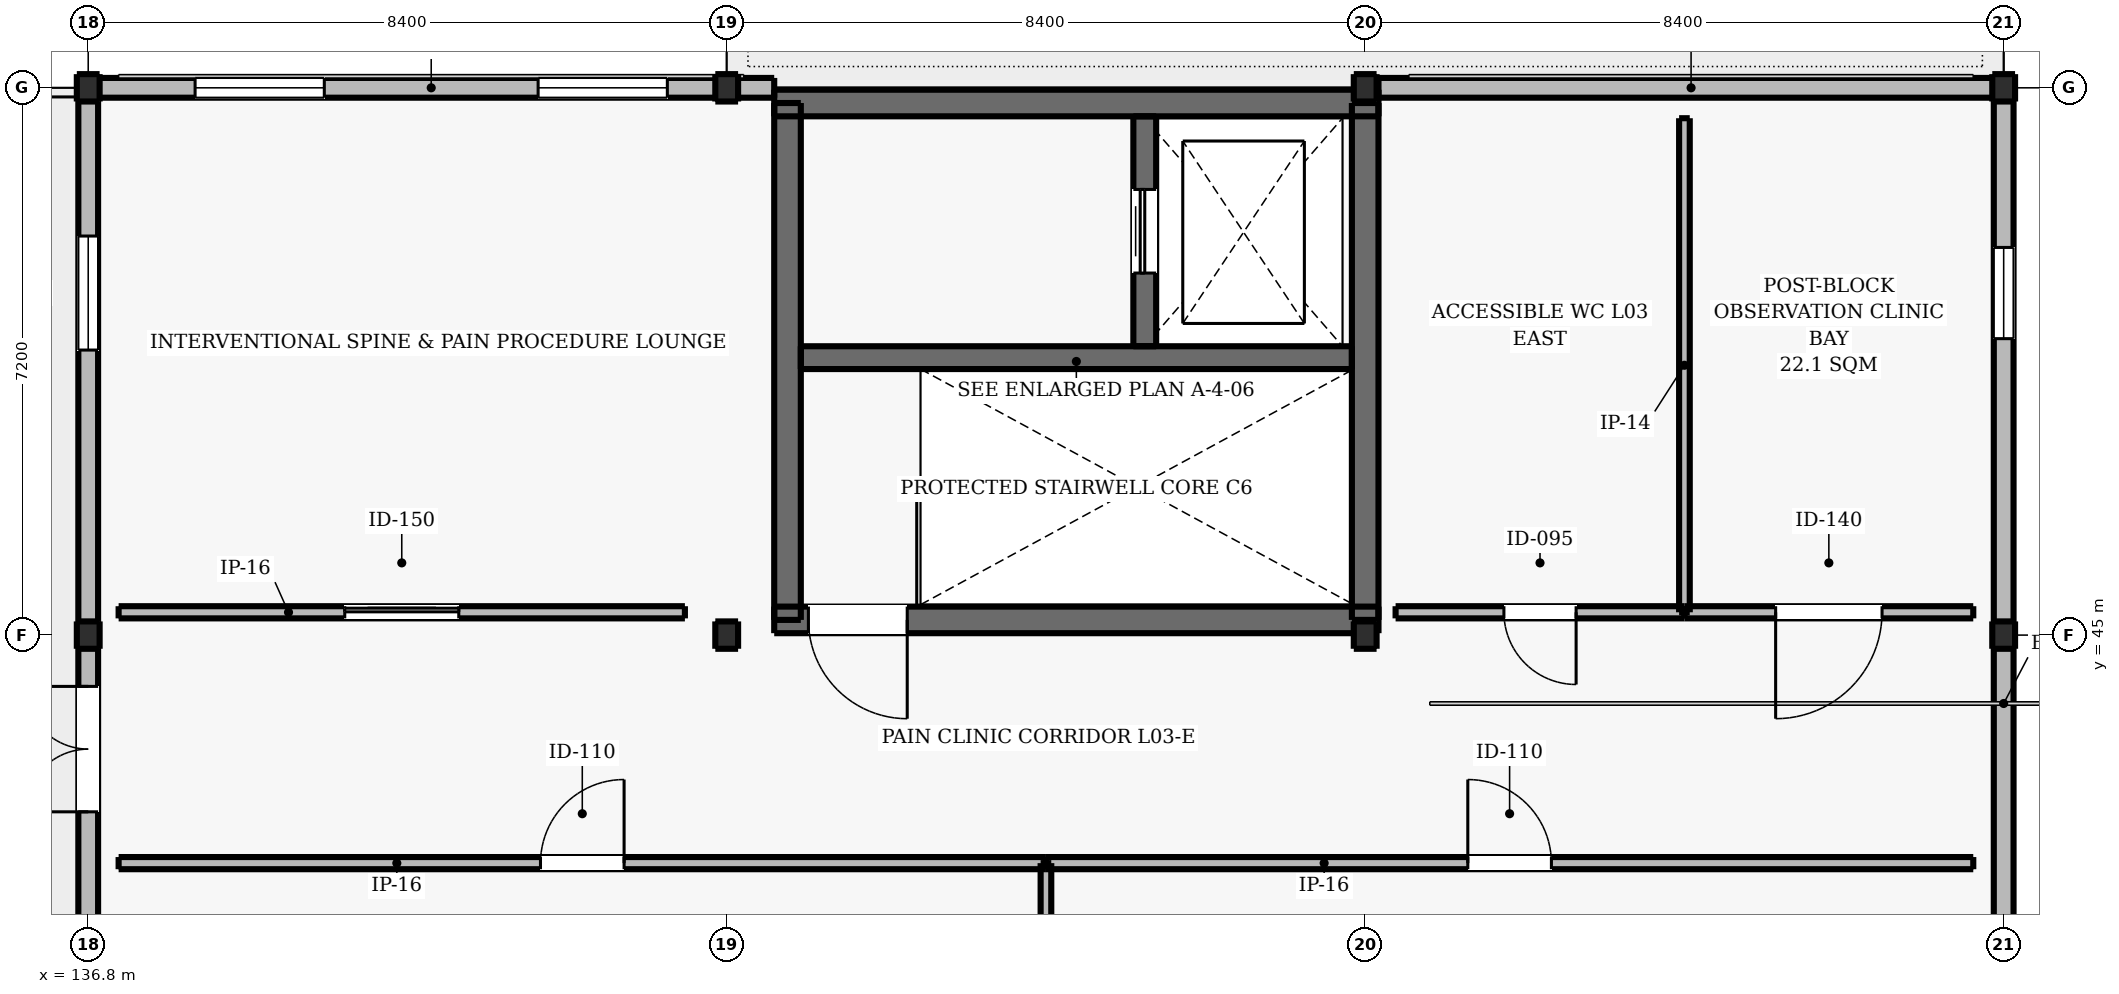
"""IFC4 building model, lengths in metres.
Left out: names, types, materials, properties, quantities, classifications, styles, units other than length and angle.
Written with IfcOpenShell. Run it as: python <this file> out.ifc"""

import sys

from ifc_helpers import new_model, si_unit, direction, frame, frame_2d, origin, origin_2d, place, context, subcontext, project, spatial, rectangle, i_section, extrude, element, fill, save


model = new_model("IFC4")
c1 = context("Model", 3, precision=1e-05, world=origin(), true_north=direction((0.0, 1.0)))
c2 = subcontext(c1, "Body", "Model", "MODEL_VIEW")
j1 = project(units=[si_unit("LENGTHUNIT", "METRE"), si_unit("PLANEANGLEUNIT", "RADIAN")], contexts=[c1])
p1 = place(None, origin())
s1 = spatial("IfcSite", under=j1, at=p1, CompositionType="ELEMENT")
p2 = place(p1, origin())
s2 = spatial("IfcBuilding", under=s1, at=p2, CompositionType="ELEMENT")
p3 = place(p2, frame((0.0, 0.0, 13.8)))
s3 = spatial("IfcBuildingStorey", under=s2, at=p3, CompositionType="ELEMENT", Elevation=13.8)
for number, where, z_axis, x_axis in (
    (1, (136.8, 45.0, 0.0), (0.0, 0.0, 1.0), (1.0, 0.0, 0.0)),
    (2, (136.8, 52.2, 0.0), (0.0, 0.0, 1.0), (1.0, 0.0, 0.0)),
    (3, (145.2, 45.0, 0.0), (0.0, 0.0, 1.0), (1.0, 0.0, 0.0)),
    (4, (145.2, 52.2, 0.0), (0.0, 0.0, 1.0), (1.0, 0.0, 0.0)),
    (5, (153.6, 45.0, 0.0), (0.0, 0.0, 1.0), (1.0, 0.0, 0.0)),
    (6, (153.6, 52.2, 0.0), (0.0, 0.0, 1.0), (1.0, 0.0, 0.0)),
    (7, (162.0, 45.0, 0.0), (0.0, 0.0, 1.0), (1.0, 0.0, 0.0)),
    (8, (162.0, 52.2, 0.0), (0.0, 0.0, 1.0), (1.0, 0.0, 0.0)),
):
    element("IfcColumn", number, at=place(p3, frame(where, z_axis=z_axis, x_axis=x_axis)), inside=s3, PredefinedType="COLUMN", context=c2, shape_type="SweptSolid", body=[
        extrude(i_section(OverallWidth=0.3, OverallDepth=0.36, WebThickness=0.012, FlangeThickness=0.022, FilletRadius=0.027, at=origin_2d()), origin(), (0.0, 0.0, 1.0), 4.2),
    ])
p4 = place(p3, frame((145.825, 45.2, 0.0), z_axis=(0.0, 0.0, 1.0), x_axis=(1.0, 0.0, 0.0)))
e9 = element("IfcWall", 9, at=p4, inside=s3, PredefinedType="SHEAR", context=c2, shape_type="SweptSolid", body=[
    extrude(rectangle(XDim=7.95, YDim=0.35, at=frame_2d((3.975, 0.0))), origin(), (0.0, 0.0, 1.0), 4.2),
])
p5 = place(p4, frame((0.45, 0.0, 0.0)))
e10 = element("IfcOpeningElement", 10, at=p5, cuts=e9, PredefinedType="OPENING", context=c2, shape_type="SweptSolid", body=[
    extrude(rectangle(XDim=1.3, YDim=2.15, at=frame_2d((0.65, 1.075))), frame((0.0, 0.185, 0.0), z_axis=(0.0, -1.0, 0.0), x_axis=(1.0, 0.0, 0.0)), (0.0, 0.0, 1.0), 0.37),
])
p6 = place(p3, frame((145.825, 52.0, 0.0), z_axis=(0.0, 0.0, 1.0), x_axis=(1.0, 0.0, 0.0)))
e11 = element("IfcWall", 11, at=p6, inside=s3, PredefinedType="SHEAR", context=c2, shape_type="SweptSolid", body=[
    extrude(rectangle(XDim=7.95, YDim=0.35, at=frame_2d((3.975, 0.0))), origin(), (0.0, 0.0, 1.0), 4.2),
])
for number, where, z_axis, x_axis in (
    (12, (146.0, 45.2, 0.0), (0.0, 0.0, 1.0), (0.0, 1.0, 0.0)),
    (13, (153.6, 45.2, 0.0), (0.0, 0.0, 1.0), (0.0, 1.0, 0.0)),
):
    element("IfcWall", number, at=place(p3, frame(where, z_axis=z_axis, x_axis=x_axis)), inside=s3, PredefinedType="SHEAR", context=c2, shape_type="SweptSolid", body=[
        extrude(rectangle(XDim=6.8, YDim=0.35, at=frame_2d((3.4, 0.0))), origin(), (0.0, 0.0, 1.0), 4.2),
    ])
p7 = place(p3, frame((146.175, 48.65, 0.0), z_axis=(0.0, 0.0, 1.0), x_axis=(1.0, 0.0, 0.0)))
e14 = element("IfcWall", 14, at=p7, inside=s3, PredefinedType="SHEAR", context=c2, shape_type="SweptSolid", body=[
    extrude(rectangle(XDim=7.25, YDim=0.3, at=frame_2d((3.625, 0.0))), origin(), (0.0, 0.0, 1.0), 4.2),
])
p8 = place(p3, frame((150.7, 48.8, 0.0), z_axis=(0.0, 0.0, 1.0), x_axis=(0.0, 1.0, 0.0)))
e15 = element("IfcWall", 15, at=p8, inside=s3, PredefinedType="SHEAR", context=c2, shape_type="SweptSolid", body=[
    extrude(rectangle(XDim=3.025, YDim=0.3, at=frame_2d((1.512, 0.0))), origin(), (0.0, 0.0, 1.0), 4.2),
])
p9 = place(p8, frame((0.963, 0.0, 0.0)))
e16 = element("IfcOpeningElement", 16, at=p9, cuts=e15, PredefinedType="OPENING", context=c2, shape_type="SweptSolid", body=[
    extrude(rectangle(XDim=1.1, YDim=2.15, at=frame_2d((0.55, 1.075))), frame((0.0, 0.16, 0.0), z_axis=(0.0, -1.0, 0.0), x_axis=(1.0, 0.0, 0.0)), (0.0, 0.0, 1.0), 0.32),
])
p10 = place(p3, frame((136.8, 52.2, 0.0), z_axis=(0.0, 0.0, 1.0), x_axis=(1.0, 0.0, 0.0)))
e17 = element("IfcWall", 17, at=p10, inside=s3, PredefinedType="SOLIDWALL", context=c2, shape_type="SweptSolid", body=[
    extrude(rectangle(XDim=9.025, YDim=0.26, at=frame_2d((4.512, 0.0))), origin(), (0.0, 0.0, 1.0), 3.53),
])
p11 = place(p10, frame((1.406, 0.0, 0.95)))
e18 = element("IfcOpeningElement", 18, at=p11, cuts=e17, PredefinedType="OPENING", context=c2, shape_type="SweptSolid", body=[
    extrude(rectangle(XDim=1.7, YDim=2.0, at=frame_2d((0.85, 1.0))), frame((0.0, 0.14, 0.0), z_axis=(0.0, -1.0, 0.0), x_axis=(1.0, 0.0, 0.0)), (0.0, 0.0, 1.0), 0.28),
])
p12 = place(p10, frame((5.919, 0.0, 0.95)))
e19 = element("IfcOpeningElement", 19, at=p12, cuts=e17, PredefinedType="OPENING", context=c2, shape_type="SweptSolid", body=[
    extrude(rectangle(XDim=1.7, YDim=2.0, at=frame_2d((0.85, 1.0))), frame((0.0, 0.14, 0.0), z_axis=(0.0, -1.0, 0.0), x_axis=(1.0, 0.0, 0.0)), (0.0, 0.0, 1.0), 0.28),
])
p13 = place(p3, frame((153.775, 52.2, 0.0), z_axis=(0.0, 0.0, 1.0), x_axis=(1.0, 0.0, 0.0)))
e20 = element("IfcWall", 20, at=p13, inside=s3, PredefinedType="SOLIDWALL", context=c2, shape_type="SweptSolid", body=[
    extrude(rectangle(XDim=8.225, YDim=0.26, at=frame_2d((4.113, 0.0))), origin(), (0.0, 0.0, 1.0), 3.53),
])
p14 = place(p3, frame((162.0, 52.2, 0.0), z_axis=(0.0, 0.0, 1.0), x_axis=(0.0, -1.0, 0.0)))
e21 = element("IfcWall", 21, at=p14, inside=s3, PredefinedType="SOLIDWALL", context=c2, shape_type="SweptSolid", body=[
    extrude(rectangle(XDim=16.2, YDim=0.26, at=frame_2d((8.1, 0.0))), origin(), (0.0, 0.0, 1.0), 3.53),
])
p15 = place(p14, frame((2.1, 0.0, 0.95)))
e22 = element("IfcOpeningElement", 22, at=p15, cuts=e21, PredefinedType="OPENING", context=c2, shape_type="SweptSolid", body=[
    extrude(rectangle(XDim=1.2, YDim=1.5, at=frame_2d((0.6, 0.75))), frame((0.0, 0.14, 0.0), z_axis=(0.0, -1.0, 0.0), x_axis=(1.0, 0.0, 0.0)), (0.0, 0.0, 1.0), 0.28),
])
p16 = place(p14, frame((12.9, 0.0, 0.95)))
e23 = element("IfcOpeningElement", 23, at=p16, cuts=e21, PredefinedType="OPENING", context=c2, shape_type="SweptSolid", body=[
    extrude(rectangle(XDim=1.2, YDim=1.5, at=frame_2d((0.6, 0.75))), frame((0.0, 0.14, 0.0), z_axis=(0.0, -1.0, 0.0), x_axis=(1.0, 0.0, 0.0)), (0.0, 0.0, 1.0), 0.28),
])
p17 = place(p3, frame((136.8, 36.0, 0.0), z_axis=(0.0, 0.0, 1.0), x_axis=(0.0, 1.0, 0.0)))
e24 = element("IfcWall", 24, at=p17, inside=s3, PredefinedType="SOLIDWALL", context=c2, shape_type="SweptSolid", body=[
    extrude(rectangle(XDim=16.2, YDim=0.26, at=frame_2d((8.1, 0.0))), origin(), (0.0, 0.0, 1.0), 3.53),
])
p18 = place(p17, frame((6.675, 0.0, 0.0)))
e25 = element("IfcOpeningElement", 25, at=p18, cuts=e24, PredefinedType="OPENING", context=c2, shape_type="SweptSolid", body=[
    extrude(rectangle(XDim=1.65, YDim=2.2, at=frame_2d((0.825, 1.1))), frame((0.0, 0.14, 0.0), z_axis=(0.0, -1.0, 0.0), x_axis=(1.0, 0.0, 0.0)), (0.0, 0.0, 1.0), 0.28),
])
p19 = place(p17, frame((1.95, 0.0, 0.95)))
e26 = element("IfcOpeningElement", 26, at=p19, cuts=e24, PredefinedType="OPENING", context=c2, shape_type="SweptSolid", body=[
    extrude(rectangle(XDim=1.5, YDim=1.6, at=frame_2d((0.75, 0.8))), frame((0.0, 0.14, 0.0), z_axis=(0.0, -1.0, 0.0), x_axis=(1.0, 0.0, 0.0)), (0.0, 0.0, 1.0), 0.28),
])
p20 = place(p17, frame((12.75, 0.0, 0.95)))
e27 = element("IfcOpeningElement", 27, at=p20, cuts=e24, PredefinedType="OPENING", context=c2, shape_type="SweptSolid", body=[
    extrude(rectangle(XDim=1.5, YDim=1.6, at=frame_2d((0.75, 0.8))), frame((0.0, 0.14, 0.0), z_axis=(0.0, -1.0, 0.0), x_axis=(1.0, 0.0, 0.0)), (0.0, 0.0, 1.0), 0.28),
])
p21 = place(p3, frame((137.2, 45.3, 0.0), z_axis=(0.0, 0.0, 1.0), x_axis=(1.0, 0.0, 0.0)))
e28 = element("IfcWall", 28, at=p21, inside=s3, PredefinedType="PARTITIONING", context=c2, shape_type="SweptSolid", body=[
    extrude(rectangle(XDim=7.45, YDim=0.16, at=frame_2d((3.725, 0.0))), origin(), (0.0, 0.0, 1.0), 3.94),
])
p22 = place(p21, frame((2.975, 0.0, 0.0)))
e29 = element("IfcOpeningElement", 29, at=p22, cuts=e28, PredefinedType="OPENING", context=c2, shape_type="SweptSolid", body=[
    extrude(rectangle(XDim=1.5, YDim=2.25, at=frame_2d((0.75, 1.125))), frame((0.0, 0.09, 0.0), z_axis=(0.0, -1.0, 0.0), x_axis=(1.0, 0.0, 0.0)), (0.0, 0.0, 1.0), 0.18),
])
p23 = place(p3, frame((154.0, 45.3, 0.0), z_axis=(0.0, 0.0, 1.0), x_axis=(1.0, 0.0, 0.0)))
e30 = element("IfcWall", 30, at=p23, inside=s3, PredefinedType="PARTITIONING", context=c2, shape_type="SweptSolid", body=[
    extrude(rectangle(XDim=3.8, YDim=0.16, at=frame_2d((1.9, 0.0))), origin(), (0.0, 0.0, 1.0), 3.94),
])
p24 = place(p23, frame((1.425, 0.0, 0.0)))
e31 = element("IfcOpeningElement", 31, at=p24, cuts=e30, PredefinedType="OPENING", context=c2, shape_type="SweptSolid", body=[
    extrude(rectangle(XDim=0.95, YDim=2.1, at=frame_2d((0.475, 1.05))), frame((0.0, 0.09, 0.0), z_axis=(0.0, -1.0, 0.0), x_axis=(1.0, 0.0, 0.0)), (0.0, 0.0, 1.0), 0.18),
])
p25 = place(p3, frame((157.8, 45.3, 0.0), z_axis=(0.0, 0.0, 1.0), x_axis=(0.0, 1.0, 0.0)))
e32 = element("IfcWall", 32, at=p25, inside=s3, PredefinedType="PARTITIONING", context=c2, shape_type="SweptSolid", body=[
    extrude(rectangle(XDim=6.5, YDim=0.14, at=frame_2d((3.25, 0.0))), origin(), (0.0, 0.0, 1.0), 3.94),
])
p26 = place(p3, frame((157.8, 45.3, 0.0), z_axis=(0.0, 0.0, 1.0), x_axis=(1.0, 0.0, 0.0)))
e33 = element("IfcWall", 33, at=p26, inside=s3, PredefinedType="PARTITIONING", context=c2, shape_type="SweptSolid", body=[
    extrude(rectangle(XDim=3.8, YDim=0.16, at=frame_2d((1.9, 0.0))), origin(), (0.0, 0.0, 1.0), 3.94),
])
p27 = place(p26, frame((1.2, 0.0, 0.0)))
e34 = element("IfcOpeningElement", 34, at=p27, cuts=e33, PredefinedType="OPENING", context=c2, shape_type="SweptSolid", body=[
    extrude(rectangle(XDim=1.4, YDim=2.2, at=frame_2d((0.7, 1.1))), frame((0.0, 0.09, 0.0), z_axis=(0.0, -1.0, 0.0), x_axis=(1.0, 0.0, 0.0)), (0.0, 0.0, 1.0), 0.18),
])
p28 = place(p3, frame((137.2, 42.0, 0.0), z_axis=(0.0, 0.0, 1.0), x_axis=(1.0, 0.0, 0.0)))
e35 = element("IfcWall", 35, at=p28, inside=s3, PredefinedType="PARTITIONING", context=c2, shape_type="SweptSolid", body=[
    extrude(rectangle(XDim=12.2, YDim=0.16, at=frame_2d((6.1, 0.0))), origin(), (0.0, 0.0, 1.0), 3.94),
])
p29 = place(p28, frame((5.55, 0.0, 0.0)))
e36 = element("IfcOpeningElement", 36, at=p29, cuts=e35, PredefinedType="OPENING", context=c2, shape_type="SweptSolid", body=[
    extrude(rectangle(XDim=1.1, YDim=2.15, at=frame_2d((0.55, 1.075))), frame((0.0, 0.09, 0.0), z_axis=(0.0, -1.0, 0.0), x_axis=(1.0, 0.0, 0.0)), (0.0, 0.0, 1.0), 0.18),
])
p30 = place(p3, frame((149.4, 36.2, 0.0), z_axis=(0.0, 0.0, 1.0), x_axis=(0.0, 1.0, 0.0)))
e37 = element("IfcWall", 37, at=p30, inside=s3, PredefinedType="PARTITIONING", context=c2, shape_type="SweptSolid", body=[
    extrude(rectangle(XDim=5.8, YDim=0.14, at=frame_2d((2.9, 0.0))), origin(), (0.0, 0.0, 1.0), 3.94),
])
p31 = place(p3, frame((149.4, 42.0, 0.0), z_axis=(0.0, 0.0, 1.0), x_axis=(1.0, 0.0, 0.0)))
e38 = element("IfcWall", 38, at=p31, inside=s3, PredefinedType="PARTITIONING", context=c2, shape_type="SweptSolid", body=[
    extrude(rectangle(XDim=12.2, YDim=0.16, at=frame_2d((6.1, 0.0))), origin(), (0.0, 0.0, 1.0), 3.94),
])
p32 = place(p31, frame((5.55, 0.0, 0.0)))
e39 = element("IfcOpeningElement", 39, at=p32, cuts=e38, PredefinedType="OPENING", context=c2, shape_type="SweptSolid", body=[
    extrude(rectangle(XDim=1.1, YDim=2.15, at=frame_2d((0.55, 1.075))), frame((0.0, 0.09, 0.0), z_axis=(0.0, -1.0, 0.0), x_axis=(1.0, 0.0, 0.0)), (0.0, 0.0, 1.0), 0.18),
])
p33 = place(p18, origin())
e40 = element("IfcDoor", 40, at=p33, inside=s3, OperationType="DOUBLE_DOOR_SINGLE_SWING", PredefinedType="DOOR", context=c2, shape_type="SweptSolid", body=[
    extrude(rectangle(XDim=1.65, YDim=2.2, at=frame_2d((0.825, 1.1))), frame((0.0, 0.025, 0.0), z_axis=(0.0, -1.0, 0.0), x_axis=(1.0, 0.0, 0.0)), (0.0, 0.0, 1.0), 0.05),
])
fill(e25, e40)
p34 = place(p11, origin())
e41 = element("IfcWindow", 41, at=p34, inside=s3, PartitioningType="SINGLE_PANEL", PredefinedType="WINDOW", context=c2, shape_type="SweptSolid", body=[
    extrude(rectangle(XDim=1.7, YDim=2.0, at=frame_2d((0.85, 1.0))), frame((0.0, 0.03, 0.0), z_axis=(0.0, -1.0, 0.0), x_axis=(1.0, 0.0, 0.0)), (0.0, 0.0, 1.0), 0.06),
])
fill(e18, e41)
p35 = place(p12, origin())
e42 = element("IfcWindow", 42, at=p35, inside=s3, PartitioningType="SINGLE_PANEL", PredefinedType="WINDOW", context=c2, shape_type="SweptSolid", body=[
    extrude(rectangle(XDim=1.7, YDim=2.0, at=frame_2d((0.85, 1.0))), frame((0.0, 0.03, 0.0), z_axis=(0.0, -1.0, 0.0), x_axis=(1.0, 0.0, 0.0)), (0.0, 0.0, 1.0), 0.06),
])
fill(e19, e42)
p36 = place(p15, origin())
e43 = element("IfcWindow", 43, at=p36, inside=s3, PartitioningType="SINGLE_PANEL", PredefinedType="WINDOW", context=c2, shape_type="SweptSolid", body=[
    extrude(rectangle(XDim=1.2, YDim=1.5, at=frame_2d((0.6, 0.75))), frame((0.0, 0.03, 0.0), z_axis=(0.0, -1.0, 0.0), x_axis=(1.0, 0.0, 0.0)), (0.0, 0.0, 1.0), 0.06),
])
fill(e22, e43)
p37 = place(p20, origin())
e44 = element("IfcWindow", 44, at=p37, inside=s3, PartitioningType="SINGLE_PANEL", PredefinedType="WINDOW", context=c2, shape_type="SweptSolid", body=[
    extrude(rectangle(XDim=1.5, YDim=1.6, at=frame_2d((0.75, 0.8))), frame((0.0, 0.03, 0.0), z_axis=(0.0, -1.0, 0.0), x_axis=(1.0, 0.0, 0.0)), (0.0, 0.0, 1.0), 0.06),
])
fill(e27, e44)
p38 = place(p9, origin())
e45 = element("IfcDoor", 45, at=p38, inside=s3, OperationType="DOUBLE_DOOR_SLIDING", PredefinedType="DOOR", context=c2, shape_type="SweptSolid", body=[
    extrude(rectangle(XDim=1.1, YDim=2.15, at=frame_2d((0.55, 1.075))), frame((0.0, 0.025, 0.0), z_axis=(0.0, -1.0, 0.0), x_axis=(1.0, 0.0, 0.0)), (0.0, 0.0, 1.0), 0.05),
])
fill(e16, e45)
p39 = place(p5, frame((1.3, 0.0, 0.0), z_axis=(0.0, 0.0, 1.0), x_axis=(-1.0, 0.0, 0.0)))
e46 = element("IfcDoor", 46, at=p39, inside=s3, OperationType="SINGLE_SWING_RIGHT", PredefinedType="DOOR", context=c2, shape_type="SweptSolid", body=[
    extrude(rectangle(XDim=1.3, YDim=2.15, at=frame_2d((0.65, 1.075))), frame((0.0, 0.025, 0.0), z_axis=(0.0, -1.0, 0.0), x_axis=(1.0, 0.0, 0.0)), (0.0, 0.0, 1.0), 0.05),
])
fill(e10, e46)
p40 = place(p22, frame((1.5, 0.0, 0.0), z_axis=(0.0, 0.0, 1.0), x_axis=(-1.0, 0.0, 0.0)))
e47 = element("IfcDoor", 47, at=p40, inside=s3, OperationType="SLIDING_TO_LEFT", PredefinedType="DOOR", context=c2, shape_type="SweptSolid", body=[
    extrude(rectangle(XDim=1.5, YDim=2.25, at=frame_2d((0.75, 1.125))), frame((0.0, 0.025, 0.0), z_axis=(0.0, -1.0, 0.0), x_axis=(1.0, 0.0, 0.0)), (0.0, 0.0, 1.0), 0.05),
])
fill(e29, e47)
p41 = place(p24, frame((0.95, 0.0, 0.0), z_axis=(0.0, 0.0, 1.0), x_axis=(-1.0, 0.0, 0.0)))
e48 = element("IfcDoor", 48, at=p41, inside=s3, OperationType="SINGLE_SWING_RIGHT", PredefinedType="DOOR", context=c2, shape_type="SweptSolid", body=[
    extrude(rectangle(XDim=0.95, YDim=2.1, at=frame_2d((0.475, 1.05))), frame((0.0, 0.025, 0.0), z_axis=(0.0, -1.0, 0.0), x_axis=(1.0, 0.0, 0.0)), (0.0, 0.0, 1.0), 0.05),
])
fill(e31, e48)
p42 = place(p27, frame((1.4, 0.0, 0.0), z_axis=(0.0, 0.0, 1.0), x_axis=(-1.0, 0.0, 0.0)))
e49 = element("IfcDoor", 49, at=p42, inside=s3, OperationType="SINGLE_SWING_LEFT", PredefinedType="DOOR", context=c2, shape_type="SweptSolid", body=[
    extrude(rectangle(XDim=1.4, YDim=2.2, at=frame_2d((0.7, 1.1))), frame((0.0, 0.025, 0.0), z_axis=(0.0, -1.0, 0.0), x_axis=(1.0, 0.0, 0.0)), (0.0, 0.0, 1.0), 0.05),
])
fill(e34, e49)
p43 = place(p29, origin())
e50 = element("IfcDoor", 50, at=p43, inside=s3, OperationType="SINGLE_SWING_RIGHT", PredefinedType="DOOR", context=c2, shape_type="SweptSolid", body=[
    extrude(rectangle(XDim=1.1, YDim=2.15, at=frame_2d((0.55, 1.075))), frame((0.0, 0.025, 0.0), z_axis=(0.0, -1.0, 0.0), x_axis=(1.0, 0.0, 0.0)), (0.0, 0.0, 1.0), 0.05),
])
fill(e36, e50)
p44 = place(p32, origin())
e51 = element("IfcDoor", 51, at=p44, inside=s3, OperationType="SINGLE_SWING_LEFT", PredefinedType="DOOR", context=c2, shape_type="SweptSolid", body=[
    extrude(rectangle(XDim=1.1, YDim=2.15, at=frame_2d((0.55, 1.075))), frame((0.0, 0.025, 0.0), z_axis=(0.0, -1.0, 0.0), x_axis=(1.0, 0.0, 0.0)), (0.0, 0.0, 1.0), 0.05),
])
fill(e39, e51)
save(model, sys.argv[1])
